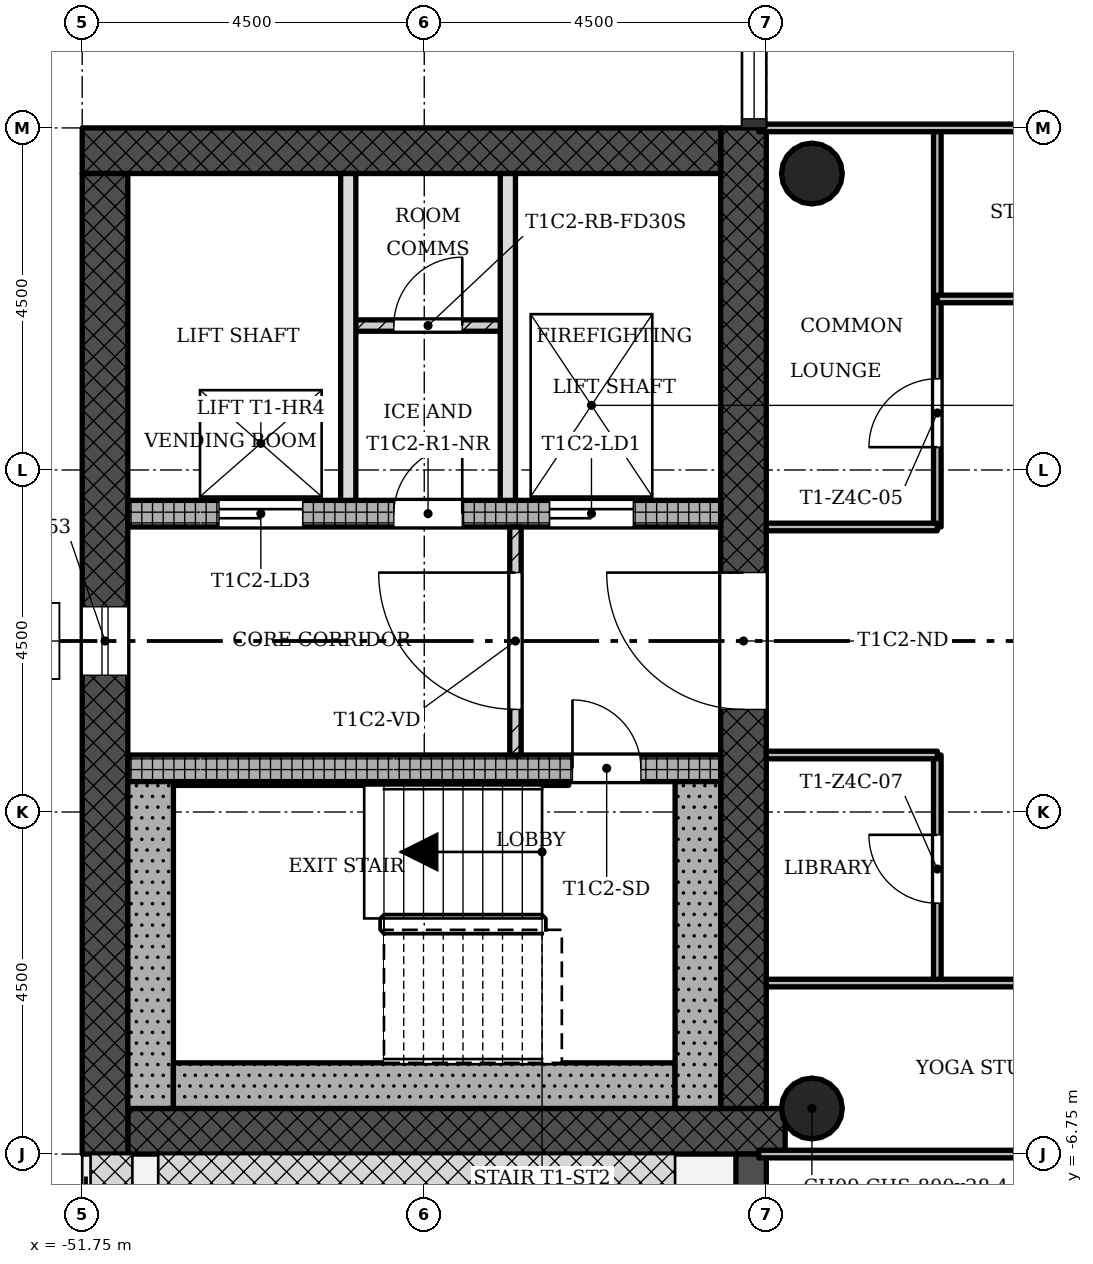
"""IFC4 building model, lengths in metres.
Left out: names, types, materials, properties, quantities, classifications, styles, units other than length and angle.
Written with IfcOpenShell. Run it as: python <this file> out.ifc"""

import sys

from ifc_helpers import new_model, si_unit, direction, frame, frame_2d, origin, origin_2d, place, context, subcontext, project, spatial, rectangle, hollow_circle, extrude, element, fill, save


model = new_model("IFC4")
c1 = context("Model", 3, precision=1e-05, world=origin(), true_north=direction((0.0, 1.0)))
c2 = subcontext(c1, "Body", "Model", "MODEL_VIEW")
j1 = project(units=[si_unit("LENGTHUNIT", "METRE"), si_unit("PLANEANGLEUNIT", "RADIAN")], contexts=[c1])
p1 = place(None, origin())
s1 = spatial("IfcSite", under=j1, at=p1, CompositionType="ELEMENT")
p2 = place(p1, origin())
s2 = spatial("IfcBuilding", under=s1, at=p2, CompositionType="ELEMENT")
p3 = place(p2, frame((0.0, 0.0, 192.6)))
s3 = spatial("IfcBuildingStorey", under=s2, at=p3, CompositionType="ELEMENT", Elevation=192.6)
p4 = place(p3, frame((-51.15, -6.45, 0.0), z_axis=(0.0, 0.0, 1.0), x_axis=(1.0, 0.0, 0.0)))
e1 = element("IfcWall", 1, at=p4, inside=s3, PredefinedType="SHEAR", context=c2, shape_type="SweptSolid", body=[
    extrude(rectangle(XDim=8.648, YDim=0.6, at=frame_2d((4.324, 0.0))), origin(), (0.0, 0.0, 1.0), 3.4),
])
p5 = place(p3, frame((-43.05, -6.15, 0.0), z_axis=(0.0, 0.0, 1.0), x_axis=(0.0, 1.0, 0.0)))
e2 = element("IfcWall", 2, at=p5, inside=s3, PredefinedType="SHEAR", context=c2, shape_type="SweptSolid", body=[
    extrude(rectangle(XDim=12.9, YDim=0.6, at=frame_2d((6.45, 0.0))), origin(), (0.0, 0.0, 1.0), 3.4),
])
p6 = place(p5, frame((5.25, 0.0, 0.0)))
e3 = element("IfcOpeningElement", 3, at=p6, cuts=e2, PredefinedType="OPENING", context=c2, shape_type="SweptSolid", body=[
    extrude(rectangle(XDim=1.8, YDim=2.1, at=frame_2d((0.9, 1.05))), frame((0.0, 0.31, 0.0), z_axis=(0.0, -1.0, 0.0), x_axis=(1.0, 0.0, 0.0)), (0.0, 0.0, 1.0), 0.62),
])
p7 = place(p3, frame((-43.35, 6.45, 0.0), z_axis=(0.0, 0.0, 1.0), x_axis=(-1.0, 0.0, 0.0)))
e4 = element("IfcWall", 4, at=p7, inside=s3, PredefinedType="SHEAR", context=c2, shape_type="SweptSolid", body=[
    extrude(rectangle(XDim=8.4, YDim=0.6, at=frame_2d((4.2, 0.0))), origin(), (0.0, 0.0, 1.0), 3.4),
])
p8 = place(p3, frame((-51.45, 6.15, 0.0), z_axis=(0.0, 0.0, 1.0), x_axis=(0.0, -1.0, 0.0)))
e5 = element("IfcWall", 5, at=p8, inside=s3, PredefinedType="SHEAR", context=c2, shape_type="SweptSolid", body=[
    extrude(rectangle(XDim=12.9, YDim=0.6, at=frame_2d((6.45, 0.0))), origin(), (0.0, 0.0, 1.0), 3.4),
])
p9 = place(p8, frame((5.7, 0.0, 0.45)))
e6 = element("IfcOpeningElement", 6, at=p9, cuts=e5, PredefinedType="OPENING", context=c2, shape_type="SweptSolid", body=[
    extrude(rectangle(XDim=0.9, YDim=2.4, at=frame_2d((0.45, 1.2))), frame((0.0, 0.31, 0.0), z_axis=(0.0, -1.0, 0.0), x_axis=(1.0, 0.0, 0.0)), (0.0, 0.0, 1.0), 0.62),
])
p10 = place(p3, frame((-51.15, -1.675, 0.0), z_axis=(0.0, 0.0, 1.0), x_axis=(1.0, 0.0, 0.0)))
e7 = element("IfcWall", 7, at=p10, inside=s3, PredefinedType="SHEAR", context=c2, shape_type="SweptSolid", body=[
    extrude(rectangle(XDim=7.8, YDim=0.35, at=frame_2d((3.9, 0.0))), origin(), (0.0, 0.0, 1.0), 3.4),
])
p11 = place(p10, frame((5.85, 0.0, 0.0)))
e8 = element("IfcOpeningElement", 8, at=p11, cuts=e7, PredefinedType="OPENING", context=c2, shape_type="SweptSolid", body=[
    extrude(rectangle(XDim=0.9, YDim=2.1, at=frame_2d((0.45, 1.05))), frame((0.0, 0.185, 0.0), z_axis=(0.0, -1.0, 0.0), x_axis=(1.0, 0.0, 0.0)), (0.0, 0.0, 1.0), 0.37),
])
p12 = place(p3, frame((-51.15, 1.675, 0.0), z_axis=(0.0, 0.0, 1.0), x_axis=(1.0, 0.0, 0.0)))
e9 = element("IfcWall", 9, at=p12, inside=s3, PredefinedType="SHEAR", context=c2, shape_type="SweptSolid", body=[
    extrude(rectangle(XDim=7.8, YDim=0.35, at=frame_2d((3.9, 0.0))), origin(), (0.0, 0.0, 1.0), 3.4),
])
p13 = place(p12, frame((5.55, 0.0, 0.0)))
e10 = element("IfcOpeningElement", 10, at=p13, cuts=e9, PredefinedType="OPENING", context=c2, shape_type="SweptSolid", body=[
    extrude(rectangle(XDim=1.1, YDim=2.1, at=frame_2d((0.55, 1.05))), frame((0.0, 0.185, 0.0), z_axis=(0.0, -1.0, 0.0), x_axis=(1.0, 0.0, 0.0)), (0.0, 0.0, 1.0), 0.37),
])
p14 = place(p12, frame((1.2, 0.0, 0.0)))
e11 = element("IfcOpeningElement", 11, at=p14, cuts=e9, PredefinedType="OPENING", context=c2, shape_type="SweptSolid", body=[
    extrude(rectangle(XDim=1.1, YDim=2.1, at=frame_2d((0.55, 1.05))), frame((0.0, 0.185, 0.0), z_axis=(0.0, -1.0, 0.0), x_axis=(1.0, 0.0, 0.0)), (0.0, 0.0, 1.0), 0.37),
])
p15 = place(p12, frame((3.5, 0.0, 0.0)))
e12 = element("IfcOpeningElement", 12, at=p15, cuts=e9, PredefinedType="OPENING", context=c2, shape_type="SweptSolid", body=[
    extrude(rectangle(XDim=0.9, YDim=2.1, at=frame_2d((0.45, 1.05))), frame((0.0, 0.185, 0.0), z_axis=(0.0, -1.0, 0.0), x_axis=(1.0, 0.0, 0.0)), (0.0, 0.0, 1.0), 0.37),
])
for number, where, z_axis, x_axis in (
    (13, (-42.15, -6.15, 0.0), (0.0, 0.0, 1.0), (1.0, 0.0, 0.0)),
    (14, (-42.15, 6.15, 0.0), (0.0, 0.0, 1.0), (1.0, 0.0, 0.0)),
):
    element("IfcColumn", number, at=place(p3, frame(where, z_axis=z_axis, x_axis=x_axis)), inside=s3, PredefinedType="COLUMN", context=c2, shape_type="SweptSolid", body=[
        extrude(hollow_circle(Radius=0.4, WallThickness=0.028, at=origin_2d()), origin(), (0.0, 0.0, 1.0), 3.4),
    ])
p16 = place(p3, frame((-42.95, -6.75, -0.02), z_axis=(0.0, 0.0, 1.0), x_axis=(0.0, -1.0, 0.0)))
e15 = element("IfcWall", 15, at=p16, inside=s3, PredefinedType="STANDARD", context=c2, shape_type="SweptSolid", body=[
    extrude(rectangle(XDim=4.5, YDim=0.4, at=frame_2d((2.25, 0.0))), origin(), (0.0, 0.0, 1.0), 3.12),
])
p17 = place(p16, frame((1.35, 0.0, 0.02)))
e16 = element("IfcOpeningElement", 16, at=p17, cuts=e15, PredefinedType="OPENING", context=c2, shape_type="SweptSolid", body=[
    extrude(rectangle(XDim=1.8, YDim=2.1, at=frame_2d((0.9, 1.05))), frame((0.0, 0.21, 0.0), z_axis=(0.0, -1.0, 0.0), x_axis=(1.0, 0.0, 0.0)), (0.0, 0.0, 1.0), 0.42),
])
p18 = place(p3, frame((-46.05, 1.5, 0.0), z_axis=(0.0, 0.0, 1.0), x_axis=(0.0, -1.0, 0.0)))
e17 = element("IfcWall", 17, at=p18, inside=s3, PredefinedType="PARTITIONING", context=c2, shape_type="SweptSolid", body=[
    extrude(rectangle(XDim=3.0, YDim=0.15, at=frame_2d((1.5, 0.0))), origin(), (0.0, 0.0, 1.0), 3.0),
])
p19 = place(p18, frame((0.6, 0.0, 0.0)))
e18 = element("IfcOpeningElement", 18, at=p19, cuts=e17, PredefinedType="OPENING", context=c2, shape_type="SweptSolid", body=[
    extrude(rectangle(XDim=1.8, YDim=2.1, at=frame_2d((0.9, 1.05))), frame((0.0, 0.085, 0.0), z_axis=(0.0, -1.0, 0.0), x_axis=(1.0, 0.0, 0.0)), (0.0, 0.0, 1.0), 0.17),
])
for number, where, z_axis, x_axis in (
    (19, (-48.25, 6.15, 0.0), (0.0, 0.0, 1.0), (0.0, -1.0, 0.0)),
    (20, (-46.15, 6.15, 0.0), (0.0, 0.0, 1.0), (0.0, -1.0, 0.0)),
):
    element("IfcWall", number, at=place(p3, frame(where, z_axis=z_axis, x_axis=x_axis)), inside=s3, PredefinedType="SOLIDWALL", context=c2, shape_type="SweptSolid", body=[
        extrude(rectangle(XDim=4.3, YDim=0.2, at=frame_2d((2.15, 0.0))), origin(), (0.0, 0.0, 1.0), 3.0),
    ])
p20 = place(p3, frame((-46.15, 4.15, 0.0), z_axis=(0.0, 0.0, 1.0), x_axis=(-1.0, 0.0, 0.0)))
e21 = element("IfcWall", 21, at=p20, inside=s3, PredefinedType="PARTITIONING", context=c2, shape_type="SweptSolid", body=[
    extrude(rectangle(XDim=2.1, YDim=0.15, at=frame_2d((1.05, 0.0))), origin(), (0.0, 0.0, 1.0), 3.0),
])
p21 = place(p20, frame((0.6, 0.0, 0.0)))
e22 = element("IfcOpeningElement", 22, at=p21, cuts=e21, PredefinedType="OPENING", context=c2, shape_type="SweptSolid", body=[
    extrude(rectangle(XDim=0.9, YDim=2.1, at=frame_2d((0.45, 1.05))), frame((0.0, 0.085, 0.0), z_axis=(0.0, -1.0, 0.0), x_axis=(1.0, 0.0, 0.0)), (0.0, 0.0, 1.0), 0.17),
])
p22 = place(p3, frame((-40.5, -4.5, 0.0), z_axis=(0.0, 0.0, 1.0), x_axis=(0.0, 1.0, 0.0)))
e23 = element("IfcWall", 23, at=p22, inside=s3, PredefinedType="PARTITIONING", context=c2, shape_type="SweptSolid", body=[
    extrude(rectangle(XDim=3.0, YDim=0.1, at=frame_2d((1.5, 0.0))), origin(), (0.0, 0.0, 1.0), 3.0),
])
p23 = place(p22, frame((1.05, 0.0, 0.0)))
e24 = element("IfcOpeningElement", 24, at=p23, cuts=e23, PredefinedType="OPENING", context=c2, shape_type="SweptSolid", body=[
    extrude(rectangle(XDim=0.9, YDim=2.1, at=frame_2d((0.45, 1.05))), frame((0.0, 0.06, 0.0), z_axis=(0.0, -1.0, 0.0), x_axis=(1.0, 0.0, 0.0)), (0.0, 0.0, 1.0), 0.12),
])
p24 = place(p3, frame((-40.5, 1.5, 0.0), z_axis=(0.0, 0.0, 1.0), x_axis=(0.0, 1.0, 0.0)))
e25 = element("IfcWall", 25, at=p24, inside=s3, PredefinedType="PARTITIONING", context=c2, shape_type="SweptSolid", body=[
    extrude(rectangle(XDim=5.25, YDim=0.1, at=frame_2d((2.625, 0.0))), origin(), (0.0, 0.0, 1.0), 3.0),
])
p25 = place(p24, frame((1.05, 0.0, 0.0)))
e26 = element("IfcOpeningElement", 26, at=p25, cuts=e25, PredefinedType="OPENING", context=c2, shape_type="SweptSolid", body=[
    extrude(rectangle(XDim=0.9, YDim=2.1, at=frame_2d((0.45, 1.05))), frame((0.0, 0.06, 0.0), z_axis=(0.0, -1.0, 0.0), x_axis=(1.0, 0.0, 0.0)), (0.0, 0.0, 1.0), 0.12),
])
p26 = place(p3, frame((-42.85, -6.75, 0.0), z_axis=(0.0, 0.0, 1.0), x_axis=(1.0, 0.0, 0.0)))
e27 = element("IfcWall", 27, at=p26, inside=s3, PredefinedType="PARTITIONING", context=c2, shape_type="SweptSolid", body=[
    extrude(rectangle(XDim=5.95, YDim=0.1, at=frame_2d((2.975, 0.0))), origin(), (0.0, 0.0, 1.0), 3.0),
])
p27 = place(p3, frame((-42.75, -4.5, 0.0), z_axis=(0.0, 0.0, 1.0), x_axis=(1.0, 0.0, 0.0)))
e28 = element("IfcWall", 28, at=p27, inside=s3, PredefinedType="PARTITIONING", context=c2, shape_type="SweptSolid", body=[
    extrude(rectangle(XDim=5.85, YDim=0.1, at=frame_2d((2.925, 0.0))), origin(), (0.0, 0.0, 1.0), 3.0),
])
p28 = place(p27, frame((3.6, 0.0, 0.0)))
e29 = element("IfcOpeningElement", 29, at=p28, cuts=e28, PredefinedType="OPENING", context=c2, shape_type="SweptSolid", body=[
    extrude(rectangle(XDim=0.9, YDim=2.1, at=frame_2d((0.45, 1.05))), frame((0.0, 0.06, 0.0), z_axis=(0.0, -1.0, 0.0), x_axis=(1.0, 0.0, 0.0)), (0.0, 0.0, 1.0), 0.12),
])
for number, where, z_axis, x_axis in (
    (30, (-42.75, -1.5, 0.0), (0.0, 0.0, 1.0), (1.0, 0.0, 0.0)),
    (31, (-42.75, 1.5, 0.0), (0.0, 0.0, 1.0), (1.0, 0.0, 0.0)),
):
    element("IfcWall", number, at=place(p3, frame(where, z_axis=z_axis, x_axis=x_axis)), inside=s3, PredefinedType="PARTITIONING", context=c2, shape_type="SweptSolid", body=[
        extrude(rectangle(XDim=2.25, YDim=0.1, at=frame_2d((1.125, 0.0))), origin(), (0.0, 0.0, 1.0), 3.0),
    ])
p29 = place(p3, frame((-40.5, 4.5, 0.0), z_axis=(0.0, 0.0, 1.0), x_axis=(1.0, 0.0, 0.0)))
e32 = element("IfcWall", 32, at=p29, inside=s3, PredefinedType="PARTITIONING", context=c2, shape_type="SweptSolid", body=[
    extrude(rectangle(XDim=3.6, YDim=0.1, at=frame_2d((1.8, 0.0))), origin(), (0.0, 0.0, 1.0), 3.0),
])
p30 = place(p29, frame((1.35, 0.0, 0.0)))
e33 = element("IfcOpeningElement", 33, at=p30, cuts=e32, PredefinedType="OPENING", context=c2, shape_type="SweptSolid", body=[
    extrude(rectangle(XDim=0.9, YDim=2.1, at=frame_2d((0.45, 1.05))), frame((0.0, 0.06, 0.0), z_axis=(0.0, -1.0, 0.0), x_axis=(1.0, 0.0, 0.0)), (0.0, 0.0, 1.0), 0.12),
])
p31 = place(p3, frame((-42.85, 6.75, 0.0), z_axis=(0.0, 0.0, 1.0), x_axis=(1.0, 0.0, 0.0)))
e34 = element("IfcWall", 34, at=p31, inside=s3, PredefinedType="PARTITIONING", context=c2, shape_type="SweptSolid", body=[
    extrude(rectangle(XDim=5.95, YDim=0.1, at=frame_2d((2.975, 0.0))), origin(), (0.0, 0.0, 1.0), 3.0),
])
p32 = place(p3, frame((-50.85, -1.85, 0.0), z_axis=(0.0, 0.0, 1.0), x_axis=(0.0, -1.0, 0.0)))
e35 = element("IfcWall", 35, at=p32, inside=s3, PredefinedType="SHEAR", context=c2, shape_type="SweptSolid", body=[
    extrude(rectangle(XDim=4.3, YDim=0.6, at=frame_2d((2.15, 0.0))), origin(), (0.0, 0.0, 1.0), 3.4),
])
p33 = place(p3, frame((-43.95, -5.85, 0.0), z_axis=(0.0, 0.0, 1.0), x_axis=(-1.0, 0.0, 0.0)))
e36 = element("IfcWall", 36, at=p33, inside=s3, PredefinedType="SHEAR", context=c2, shape_type="SweptSolid", body=[
    extrude(rectangle(XDim=6.6, YDim=0.6, at=frame_2d((3.3, 0.0))), origin(), (0.0, 0.0, 1.0), 3.4),
])
p34 = place(p3, frame((-43.65, -1.85, 0.0), z_axis=(0.0, 0.0, 1.0), x_axis=(0.0, -1.0, 0.0)))
e37 = element("IfcWall", 37, at=p34, inside=s3, PredefinedType="SHEAR", context=c2, shape_type="SweptSolid", body=[
    extrude(rectangle(XDim=4.3, YDim=0.6, at=frame_2d((2.15, 0.0))), origin(), (0.0, 0.0, 1.0), 3.4),
])
p35 = place(p3, frame((-45.35, -1.875, 0.0), z_axis=(0.0, 0.0, 1.0), x_axis=(-1.0, 0.0, 0.0)))
e38 = element("IfcWall", 38, at=p35, inside=s3, PredefinedType="SHEAR", context=c2, shape_type="SweptSolid", body=[
    extrude(rectangle(XDim=5.2, YDim=0.05, at=frame_2d((2.6, 0.0))), origin(), (0.0, 0.0, 1.0), 3.4),
])
p36 = place(p9, origin())
e39 = element("IfcWindow", 39, at=p36, inside=s3, PartitioningType="SINGLE_PANEL", PredefinedType="WINDOW", context=c2, shape_type="SweptSolid", body=[
    extrude(rectangle(XDim=0.9, YDim=2.4, at=frame_2d((0.45, 1.2))), frame((0.0, 0.03, 0.0), z_axis=(0.0, -1.0, 0.0), x_axis=(1.0, 0.0, 0.0)), (0.0, 0.0, 1.0), 0.06),
])
fill(e6, e39)
p37 = place(p19, origin())
e40 = element("IfcDoor", 40, at=p37, inside=s3, OperationType="SINGLE_SWING_LEFT", PredefinedType="DOOR", context=c2, shape_type="SweptSolid", body=[
    extrude(rectangle(XDim=1.8, YDim=2.1, at=frame_2d((0.9, 1.05))), frame((0.0, 0.025, 0.0), z_axis=(0.0, -1.0, 0.0), x_axis=(1.0, 0.0, 0.0)), (0.0, 0.0, 1.0), 0.05),
])
fill(e18, e40)
p38 = place(p21, origin())
e41 = element("IfcDoor", 41, at=p38, inside=s3, OperationType="SINGLE_SWING_LEFT", PredefinedType="DOOR", context=c2, shape_type="SweptSolid", body=[
    extrude(rectangle(XDim=0.9, YDim=2.1, at=frame_2d((0.45, 1.05))), frame((0.0, 0.025, 0.0), z_axis=(0.0, -1.0, 0.0), x_axis=(1.0, 0.0, 0.0)), (0.0, 0.0, 1.0), 0.05),
])
fill(e22, e41)
p39 = place(p25, origin())
e42 = element("IfcDoor", 42, at=p39, inside=s3, OperationType="SINGLE_SWING_RIGHT", PredefinedType="DOOR", context=c2, shape_type="SweptSolid", body=[
    extrude(rectangle(XDim=0.9, YDim=2.1, at=frame_2d((0.45, 1.05))), frame((0.0, 0.025, 0.0), z_axis=(0.0, -1.0, 0.0), x_axis=(1.0, 0.0, 0.0)), (0.0, 0.0, 1.0), 0.05),
])
fill(e26, e42)
p40 = place(p23, origin())
e43 = element("IfcDoor", 43, at=p40, inside=s3, OperationType="SINGLE_SWING_LEFT", PredefinedType="DOOR", context=c2, shape_type="SweptSolid", body=[
    extrude(rectangle(XDim=0.9, YDim=2.1, at=frame_2d((0.45, 1.05))), frame((0.0, 0.025, 0.0), z_axis=(0.0, -1.0, 0.0), x_axis=(1.0, 0.0, 0.0)), (0.0, 0.0, 1.0), 0.05),
])
fill(e24, e43)
p41 = place(p11, origin())
e44 = element("IfcDoor", 44, at=p41, inside=s3, OperationType="SINGLE_SWING_RIGHT", PredefinedType="DOOR", context=c2, shape_type="SweptSolid", body=[
    extrude(rectangle(XDim=0.9, YDim=2.1, at=frame_2d((0.45, 1.05))), frame((0.0, 0.025, 0.0), z_axis=(0.0, -1.0, 0.0), x_axis=(1.0, 0.0, 0.0)), (0.0, 0.0, 1.0), 0.05),
])
fill(e8, e44)
p42 = place(p13, origin())
e45 = element("IfcDoor", 45, at=p42, inside=s3, OperationType="SLIDING_TO_LEFT", PredefinedType="DOOR", context=c2, shape_type="SweptSolid", body=[
    extrude(rectangle(XDim=1.1, YDim=2.1, at=frame_2d((0.55, 1.05))), frame((0.0, 0.025, 0.0), z_axis=(0.0, -1.0, 0.0), x_axis=(1.0, 0.0, 0.0)), (0.0, 0.0, 1.0), 0.05),
])
fill(e10, e45)
p43 = place(p14, origin())
e46 = element("IfcDoor", 46, at=p43, inside=s3, OperationType="SLIDING_TO_LEFT", PredefinedType="DOOR", context=c2, shape_type="SweptSolid", body=[
    extrude(rectangle(XDim=1.1, YDim=2.1, at=frame_2d((0.55, 1.05))), frame((0.0, 0.025, 0.0), z_axis=(0.0, -1.0, 0.0), x_axis=(1.0, 0.0, 0.0)), (0.0, 0.0, 1.0), 0.05),
])
fill(e11, e46)
p44 = place(p15, origin())
e47 = element("IfcDoor", 47, at=p44, inside=s3, OperationType="SINGLE_SWING_LEFT", PredefinedType="DOOR", context=c2, shape_type="SweptSolid", body=[
    extrude(rectangle(XDim=0.9, YDim=2.1, at=frame_2d((0.45, 1.05))), frame((0.0, 0.025, 0.0), z_axis=(0.0, -1.0, 0.0), x_axis=(1.0, 0.0, 0.0)), (0.0, 0.0, 1.0), 0.05),
])
fill(e12, e47)
p45 = place(p6, origin())
e48 = element("IfcDoor", 48, at=p45, inside=s3, OperationType="SINGLE_SWING_LEFT", PredefinedType="DOOR", context=c2, shape_type="SweptSolid", body=[
    extrude(rectangle(XDim=1.8, YDim=2.1, at=frame_2d((0.9, 1.05))), frame((0.0, 0.025, 0.0), z_axis=(0.0, -1.0, 0.0), x_axis=(1.0, 0.0, 0.0)), (0.0, 0.0, 1.0), 0.05),
])
fill(e3, e48)
save(model, sys.argv[1])
